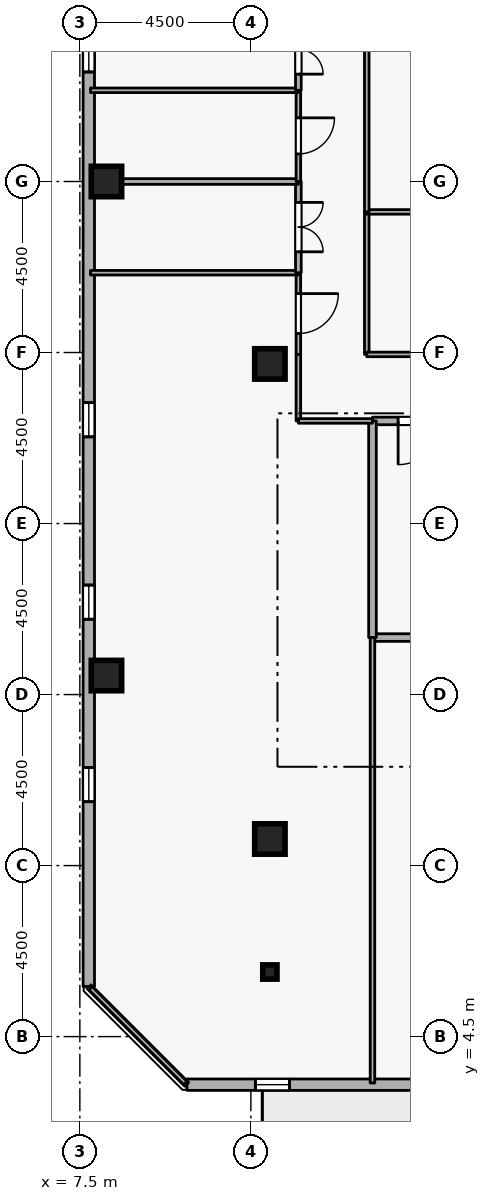
"""IFC4 building model, lengths in metres.
Left out: names, types, materials, properties, quantities, classifications, styles, units other than length and angle.
Written with IfcOpenShell. Run it as: python <this file> out.ifc"""

import sys

from ifc_helpers import new_model, si_unit, direction, frame, frame_2d, origin, origin_2d, place, context, subcontext, project, spatial, rectangle, i_section, extrude, element, fill, save


model = new_model("IFC4")
c1 = context("Model", 3, precision=1e-05, world=origin(), true_north=direction((0.0, 1.0)))
c2 = subcontext(c1, "Body", "Model", "MODEL_VIEW")
j1 = project(units=[si_unit("LENGTHUNIT", "METRE"), si_unit("PLANEANGLEUNIT", "RADIAN")], contexts=[c1])
p1 = place(None, origin())
s1 = spatial("IfcSite", under=j1, at=p1, CompositionType="ELEMENT")
p2 = place(p1, origin())
s2 = spatial("IfcBuilding", under=s1, at=p2, CompositionType="ELEMENT")
p3 = place(p2, frame((0.0, 0.0, 276.3)))
s3 = spatial("IfcBuildingStorey", under=s2, at=p3, CompositionType="ELEMENT", Elevation=276.3)
for number, where, z_axis, x_axis in (
    (1, (12.5, 9.7, 0.0), (0.0, 0.0, 1.0), (1.0, 0.0, 0.0)),
    (2, (8.2, 14.0, 0.0), (0.0, 0.0, 1.0), (1.0, 0.0, 0.0)),
    (3, (8.2, 27.0, 0.0), (0.0, 0.0, 1.0), (1.0, 0.0, 0.0)),
    (4, (12.5, 22.2, 0.0), (0.0, 0.0, 1.0), (1.0, 0.0, 0.0)),
):
    element("IfcColumn", number, at=place(p3, frame(where, z_axis=z_axis, x_axis=x_axis)), inside=s3, PredefinedType="COLUMN", context=c2, shape_type="SweptSolid", body=[
        extrude(rectangle(XDim=0.8, YDim=0.8, at=origin_2d()), origin(), (0.0, 0.0, 1.0), 3.6),
    ])
p4 = place(p3, frame((12.5, 6.2, 0.0), z_axis=(0.0, 0.0, 1.0), x_axis=(1.0, 0.0, 0.0)))
e5 = element("IfcColumn", 5, at=p4, inside=s3, PredefinedType="COLUMN", context=c2, shape_type="SweptSolid", body=[
    extrude(i_section(OverallWidth=0.375, OverallDepth=0.375, WebThickness=0.017, FlangeThickness=0.027, FilletRadius=0.015, at=origin_2d()), origin(), (0.0, 0.0, 1.0), 3.6),
])
p5 = place(p3, frame((10.319, 3.235, 0.0), z_axis=(0.0, 0.0, 1.0), x_axis=(1.0, 0.0, 0.0)))
e6 = element("IfcWall", 6, at=p5, inside=s3, PredefinedType="STANDARD", context=c2, shape_type="SweptSolid", body=[
    extrude(rectangle(XDim=36.363, YDim=0.3, at=frame_2d((18.181, 0.0))), origin(), (0.0, 0.0, 1.0), 2.66),
])
p6 = place(p5, frame((23.581, 0.0, 0.0)))
e7 = element("IfcOpeningElement", 7, at=p6, cuts=e6, PredefinedType="OPENING", context=c2, shape_type="SweptSolid", body=[
    extrude(rectangle(XDim=1.0, YDim=2.08, at=frame_2d((0.5, 1.04))), frame((0.0, 0.16, 0.0), z_axis=(0.0, -1.0, 0.0), x_axis=(1.0, 0.0, 0.0)), (0.0, 0.0, 1.0), 0.32),
])
p7 = place(p5, frame((1.8, 0.0, 0.72)))
e8 = element("IfcOpeningElement", 8, at=p7, cuts=e6, PredefinedType="OPENING", context=c2, shape_type="SweptSolid", body=[
    extrude(rectangle(XDim=0.9, YDim=1.75, at=frame_2d((0.45, 0.875))), frame((0.0, 0.16, 0.0), z_axis=(0.0, -1.0, 0.0), x_axis=(1.0, 0.0, 0.0)), (0.0, 0.0, 1.0), 0.32),
])
p8 = place(p5, frame((6.6, 0.0, 0.72)))
e9 = element("IfcOpeningElement", 9, at=p8, cuts=e6, PredefinedType="OPENING", context=c2, shape_type="SweptSolid", body=[
    extrude(rectangle(XDim=0.9, YDim=1.75, at=frame_2d((0.45, 0.875))), frame((0.0, 0.16, 0.0), z_axis=(0.0, -1.0, 0.0), x_axis=(1.0, 0.0, 0.0)), (0.0, 0.0, 1.0), 0.32),
])
p9 = place(p5, frame((11.4, 0.0, 0.72)))
e10 = element("IfcOpeningElement", 10, at=p9, cuts=e6, PredefinedType="OPENING", context=c2, shape_type="SweptSolid", body=[
    extrude(rectangle(XDim=0.9, YDim=1.75, at=frame_2d((0.45, 0.875))), frame((0.0, 0.16, 0.0), z_axis=(0.0, -1.0, 0.0), x_axis=(1.0, 0.0, 0.0)), (0.0, 0.0, 1.0), 0.32),
])
p10 = place(p5, frame((16.2, 0.0, 0.72)))
e11 = element("IfcOpeningElement", 11, at=p10, cuts=e6, PredefinedType="OPENING", context=c2, shape_type="SweptSolid", body=[
    extrude(rectangle(XDim=0.9, YDim=1.75, at=frame_2d((0.45, 0.875))), frame((0.0, 0.16, 0.0), z_axis=(0.0, -1.0, 0.0), x_axis=(1.0, 0.0, 0.0)), (0.0, 0.0, 1.0), 0.32),
])
p11 = place(p5, frame((21.0, 0.0, 0.72)))
e12 = element("IfcOpeningElement", 12, at=p11, cuts=e6, PredefinedType="OPENING", context=c2, shape_type="SweptSolid", body=[
    extrude(rectangle(XDim=0.9, YDim=1.75, at=frame_2d((0.45, 0.875))), frame((0.0, 0.16, 0.0), z_axis=(0.0, -1.0, 0.0), x_axis=(1.0, 0.0, 0.0)), (0.0, 0.0, 1.0), 0.32),
])
p12 = place(p5, frame((25.8, 0.0, 0.72)))
e13 = element("IfcOpeningElement", 13, at=p12, cuts=e6, PredefinedType="OPENING", context=c2, shape_type="SweptSolid", body=[
    extrude(rectangle(XDim=0.9, YDim=1.75, at=frame_2d((0.45, 0.875))), frame((0.0, 0.16, 0.0), z_axis=(0.0, -1.0, 0.0), x_axis=(1.0, 0.0, 0.0)), (0.0, 0.0, 1.0), 0.32),
])
p13 = place(p5, frame((30.6, 0.0, 0.72)))
e14 = element("IfcOpeningElement", 14, at=p13, cuts=e6, PredefinedType="OPENING", context=c2, shape_type="SweptSolid", body=[
    extrude(rectangle(XDim=0.9, YDim=1.75, at=frame_2d((0.45, 0.875))), frame((0.0, 0.16, 0.0), z_axis=(0.0, -1.0, 0.0), x_axis=(1.0, 0.0, 0.0)), (0.0, 0.0, 1.0), 0.32),
])
p14 = place(p3, frame((7.735, 42.181, 0.0), z_axis=(0.0, 0.0, 1.0), x_axis=(0.0, -1.0, 0.0)))
e15 = element("IfcWall", 15, at=p14, inside=s3, PredefinedType="STANDARD", context=c2, shape_type="SweptSolid", body=[
    extrude(rectangle(XDim=36.363, YDim=0.3, at=frame_2d((18.181, 0.0))), origin(), (0.0, 0.0, 1.0), 2.66),
])
p15 = place(p14, frame((6.6, 0.0, 0.72)))
e16 = element("IfcOpeningElement", 16, at=p15, cuts=e15, PredefinedType="OPENING", context=c2, shape_type="SweptSolid", body=[
    extrude(rectangle(XDim=0.9, YDim=1.75, at=frame_2d((0.45, 0.875))), frame((0.0, 0.16, 0.0), z_axis=(0.0, -1.0, 0.0), x_axis=(1.0, 0.0, 0.0)), (0.0, 0.0, 1.0), 0.32),
])
p16 = place(p14, frame((11.4, 0.0, 0.72)))
e17 = element("IfcOpeningElement", 17, at=p16, cuts=e15, PredefinedType="OPENING", context=c2, shape_type="SweptSolid", body=[
    extrude(rectangle(XDim=0.9, YDim=1.75, at=frame_2d((0.45, 0.875))), frame((0.0, 0.16, 0.0), z_axis=(0.0, -1.0, 0.0), x_axis=(1.0, 0.0, 0.0)), (0.0, 0.0, 1.0), 0.32),
])
p17 = place(p14, frame((21.0, 0.0, 0.72)))
e18 = element("IfcOpeningElement", 18, at=p17, cuts=e15, PredefinedType="OPENING", context=c2, shape_type="SweptSolid", body=[
    extrude(rectangle(XDim=0.9, YDim=1.75, at=frame_2d((0.45, 0.875))), frame((0.0, 0.16, 0.0), z_axis=(0.0, -1.0, 0.0), x_axis=(1.0, 0.0, 0.0)), (0.0, 0.0, 1.0), 0.32),
])
p18 = place(p14, frame((25.8, 0.0, 0.72)))
e19 = element("IfcOpeningElement", 19, at=p18, cuts=e15, PredefinedType="OPENING", context=c2, shape_type="SweptSolid", body=[
    extrude(rectangle(XDim=0.9, YDim=1.75, at=frame_2d((0.45, 0.875))), frame((0.0, 0.16, 0.0), z_axis=(0.0, -1.0, 0.0), x_axis=(1.0, 0.0, 0.0)), (0.0, 0.0, 1.0), 0.32),
])
p19 = place(p14, frame((30.6, 0.0, 0.72)))
e20 = element("IfcOpeningElement", 20, at=p19, cuts=e15, PredefinedType="OPENING", context=c2, shape_type="SweptSolid", body=[
    extrude(rectangle(XDim=0.9, YDim=1.75, at=frame_2d((0.45, 0.875))), frame((0.0, 0.16, 0.0), z_axis=(0.0, -1.0, 0.0), x_axis=(1.0, 0.0, 0.0)), (0.0, 0.0, 1.0), 0.32),
])
p20 = place(p3, frame((15.2, 15.0, 0.0), z_axis=(0.0, 0.0, 1.0), x_axis=(1.0, 0.0, 0.0)))
e21 = element("IfcWall", 21, at=p20, inside=s3, PredefinedType="STANDARD", context=c2, shape_type="SweptSolid", body=[
    extrude(rectangle(XDim=2.5, YDim=0.2, at=frame_2d((1.25, 0.0))), origin(), (0.0, 0.0, 1.0), 3.26),
])
p21 = place(p3, frame((17.7, 20.7, 0.0), z_axis=(0.0, 0.0, 1.0), x_axis=(-1.0, 0.0, 0.0)))
e22 = element("IfcWall", 22, at=p21, inside=s3, PredefinedType="STANDARD", context=c2, shape_type="SweptSolid", body=[
    extrude(rectangle(XDim=2.5, YDim=0.2, at=frame_2d((1.25, 0.0))), origin(), (0.0, 0.0, 1.0), 3.26),
])
p22 = place(p21, frame((0.675, 0.0, 0.0)))
e23 = element("IfcOpeningElement", 23, at=p22, cuts=e22, PredefinedType="OPENING", context=c2, shape_type="SweptSolid", body=[
    extrude(rectangle(XDim=1.15, YDim=2.1, at=frame_2d((0.575, 1.05))), frame((0.0, 0.11, 0.0), z_axis=(0.0, -1.0, 0.0), x_axis=(1.0, 0.0, 0.0)), (0.0, 0.0, 1.0), 0.22),
])
p23 = place(p3, frame((15.2, 20.7, 0.0), z_axis=(0.0, 0.0, 1.0), x_axis=(0.0, -1.0, 0.0)))
e24 = element("IfcWall", 24, at=p23, inside=s3, PredefinedType="STANDARD", context=c2, shape_type="SweptSolid", body=[
    extrude(rectangle(XDim=5.7, YDim=0.2, at=frame_2d((2.85, 0.0))), origin(), (0.0, 0.0, 1.0), 3.26),
])
p24 = place(p3, frame((13.25, 24.6, 0.0), z_axis=(0.0, 0.0, 1.0), x_axis=(0.0, -1.0, 0.0)))
e25 = element("IfcWall", 25, at=p24, inside=s3, PredefinedType="PARTITIONING", context=c2, shape_type="SweptSolid", body=[
    extrude(rectangle(XDim=2.15, YDim=0.12, at=frame_2d((1.075, 0.0))), origin(), (0.0, 0.0, 1.0), 3.26),
])
p25 = place(p24, frame((0.55, 0.0, 0.0)))
e26 = element("IfcOpeningElement", 26, at=p25, cuts=e25, PredefinedType="OPENING", context=c2, shape_type="SweptSolid", body=[
    extrude(rectangle(XDim=1.05, YDim=2.1, at=frame_2d((0.525, 1.05))), frame((0.0, 0.07, 0.0), z_axis=(0.0, -1.0, 0.0), x_axis=(1.0, 0.0, 0.0)), (0.0, 0.0, 1.0), 0.14),
])
p26 = place(p3, frame((13.25, 22.45, 0.0), z_axis=(0.0, 0.0, 1.0), x_axis=(0.0, -1.0, 0.0)))
e27 = element("IfcWall", 27, at=p26, inside=s3, PredefinedType="PARTITIONING", context=c2, shape_type="SweptSolid", body=[
    extrude(rectangle(XDim=1.75, YDim=0.12, at=frame_2d((0.875, 0.0))), origin(), (0.0, 0.0, 1.0), 3.26),
])
p27 = place(p3, frame((13.25, 20.7, 0.0), z_axis=(0.0, 0.0, 1.0), x_axis=(1.0, 0.0, 0.0)))
e28 = element("IfcWall", 28, at=p27, inside=s3, PredefinedType="PARTITIONING", context=c2, shape_type="SweptSolid", body=[
    extrude(rectangle(XDim=1.95, YDim=0.12, at=frame_2d((0.975, 0.0))), origin(), (0.0, 0.0, 1.0), 3.26),
])
p28 = place(p3, frame((15.2, 15.0, 0.0), z_axis=(0.0, 0.0, 1.0), x_axis=(0.0, -1.0, 0.0)))
e29 = element("IfcWall", 29, at=p28, inside=s3, PredefinedType="PARTITIONING", context=c2, shape_type="SweptSolid", body=[
    extrude(rectangle(XDim=11.72, YDim=0.12, at=frame_2d((5.86, 0.0))), origin(), (0.0, 0.0, 1.0), 3.26),
])
p29 = place(p3, frame((10.275, 3.28, 0.0), z_axis=(0.0, 0.0, 1.0), x_axis=(-0.707106781187, 0.707106781187, 0.0)))
e30 = element("IfcWall", 30, at=p29, inside=s3, PredefinedType="PARTITIONING", context=c2, shape_type="SweptSolid", body=[
    extrude(rectangle(XDim=3.528, YDim=0.12, at=frame_2d((1.764, 0.0))), origin(), (0.0, 0.0, 1.0), 3.26),
])
p30 = place(p3, frame((7.78, 24.6, 0.0), z_axis=(0.0, 0.0, 1.0), x_axis=(1.0, 0.0, 0.0)))
e31 = element("IfcWall", 31, at=p30, inside=s3, PredefinedType="PARTITIONING", context=c2, shape_type="SweptSolid", body=[
    extrude(rectangle(XDim=5.47, YDim=0.12, at=frame_2d((2.735, 0.0))), origin(), (0.0, 0.0, 1.0), 3.26),
])
p31 = place(p3, frame((13.25, 27.0, 0.0), z_axis=(0.0, 0.0, 1.0), x_axis=(0.0, -1.0, 0.0)))
e32 = element("IfcWall", 32, at=p31, inside=s3, PredefinedType="PARTITIONING", context=c2, shape_type="SweptSolid", body=[
    extrude(rectangle(XDim=2.4, YDim=0.15, at=frame_2d((1.2, 0.0))), origin(), (0.0, 0.0, 1.0), 3.26),
])
p32 = place(p31, frame((0.55, 0.0, 0.0)))
e33 = element("IfcOpeningElement", 33, at=p32, cuts=e32, PredefinedType="OPENING", context=c2, shape_type="SweptSolid", body=[
    extrude(rectangle(XDim=1.3, YDim=2.12, at=frame_2d((0.65, 1.06))), frame((0.0, 0.085, 0.0), z_axis=(0.0, -1.0, 0.0), x_axis=(1.0, 0.0, 0.0)), (0.0, 0.0, 1.0), 0.17),
])
p33 = place(p3, frame((7.78, 27.0, 0.0), z_axis=(0.0, 0.0, 1.0), x_axis=(1.0, 0.0, 0.0)))
e34 = element("IfcWall", 34, at=p33, inside=s3, PredefinedType="PARTITIONING", context=c2, shape_type="SweptSolid", body=[
    extrude(rectangle(XDim=5.47, YDim=0.15, at=frame_2d((2.735, 0.0))), origin(), (0.0, 0.0, 1.0), 2.802),
])
p34 = place(p3, frame((13.25, 29.4, 0.0), z_axis=(0.0, 0.0, 1.0), x_axis=(0.0, -1.0, 0.0)))
e35 = element("IfcWall", 35, at=p34, inside=s3, PredefinedType="PARTITIONING", context=c2, shape_type="SweptSolid", body=[
    extrude(rectangle(XDim=2.4, YDim=0.12, at=frame_2d((1.2, 0.0))), origin(), (0.0, 0.0, 1.0), 3.26),
])
p35 = place(p34, frame((0.725, 0.0, 0.0)))
e36 = element("IfcOpeningElement", 36, at=p35, cuts=e35, PredefinedType="OPENING", context=c2, shape_type="SweptSolid", body=[
    extrude(rectangle(XDim=0.95, YDim=2.1, at=frame_2d((0.475, 1.05))), frame((0.0, 0.07, 0.0), z_axis=(0.0, -1.0, 0.0), x_axis=(1.0, 0.0, 0.0)), (0.0, 0.0, 1.0), 0.14),
])
p36 = place(p3, frame((7.78, 29.4, 0.0), z_axis=(0.0, 0.0, 1.0), x_axis=(1.0, 0.0, 0.0)))
e37 = element("IfcWall", 37, at=p36, inside=s3, PredefinedType="PARTITIONING", context=c2, shape_type="SweptSolid", body=[
    extrude(rectangle(XDim=5.47, YDim=0.12, at=frame_2d((2.735, 0.0))), origin(), (0.0, 0.0, 1.0), 3.26),
])
p37 = place(p3, frame((13.25, 31.55, 0.0), z_axis=(0.0, 0.0, 1.0), x_axis=(0.0, -1.0, 0.0)))
e38 = element("IfcWall", 38, at=p37, inside=s3, PredefinedType="PARTITIONING", context=c2, shape_type="SweptSolid", body=[
    extrude(rectangle(XDim=2.15, YDim=0.15, at=frame_2d((1.075, 0.0))), origin(), (0.0, 0.0, 1.0), 3.26),
])
p38 = place(p37, frame((0.425, 0.0, 0.0)))
e39 = element("IfcOpeningElement", 39, at=p38, cuts=e38, PredefinedType="OPENING", context=c2, shape_type="SweptSolid", body=[
    extrude(rectangle(XDim=1.3, YDim=2.12, at=frame_2d((0.65, 1.06))), frame((0.0, 0.085, 0.0), z_axis=(0.0, -1.0, 0.0), x_axis=(1.0, 0.0, 0.0)), (0.0, 0.0, 1.0), 0.17),
])
p39 = place(p3, frame((15.05, 22.45, 0.0), z_axis=(0.0, 0.0, 1.0), x_axis=(0.0, 1.0, 0.0)))
e40 = element("IfcWall", 40, at=p39, inside=s3, PredefinedType="PARTITIONING", context=c2, shape_type="SweptSolid", body=[
    extrude(rectangle(XDim=3.75, YDim=0.12, at=frame_2d((1.875, 0.0))), origin(), (0.0, 0.0, 1.0), 3.26),
])
p40 = place(p3, frame((15.05, 26.2, 0.0), z_axis=(0.0, 0.0, 1.0), x_axis=(1.0, 0.0, 0.0)))
e41 = element("IfcWall", 41, at=p40, inside=s3, PredefinedType="PARTITIONING", context=c2, shape_type="SweptSolid", body=[
    extrude(rectangle(XDim=5.85, YDim=0.12, at=frame_2d((2.925, 0.0))), origin(), (0.0, 0.0, 1.0), 3.26),
])
p41 = place(p3, frame((20.9, 22.45, 0.0), z_axis=(0.0, 0.0, 1.0), x_axis=(-1.0, 0.0, 0.0)))
e42 = element("IfcWall", 42, at=p41, inside=s3, PredefinedType="PARTITIONING", context=c2, shape_type="SweptSolid", body=[
    extrude(rectangle(XDim=5.85, YDim=0.12, at=frame_2d((2.925, 0.0))), origin(), (0.0, 0.0, 1.0), 3.26),
])
p42 = place(p41, frame((2.45, 0.0, 0.0)))
e43 = element("IfcOpeningElement", 43, at=p42, cuts=e42, PredefinedType="OPENING", context=c2, shape_type="SweptSolid", body=[
    extrude(rectangle(XDim=0.95, YDim=2.1, at=frame_2d((0.475, 1.05))), frame((0.0, 0.07, 0.0), z_axis=(0.0, -1.0, 0.0), x_axis=(1.0, 0.0, 0.0)), (0.0, 0.0, 1.0), 0.14),
])
p43 = place(p3, frame((15.05, 26.2, 0.0), z_axis=(0.0, 0.0, 1.0), x_axis=(0.0, 1.0, 0.0)))
e44 = element("IfcWall", 44, at=p43, inside=s3, PredefinedType="PARTITIONING", context=c2, shape_type="SweptSolid", body=[
    extrude(rectangle(XDim=5.35, YDim=0.12, at=frame_2d((2.675, 0.0))), origin(), (0.0, 0.0, 1.0), 3.26),
])
p44 = place(p7, origin())
e45 = element("IfcWindow", 45, at=p44, inside=s3, PartitioningType="SINGLE_PANEL", PredefinedType="WINDOW", context=c2, shape_type="SweptSolid", body=[
    extrude(rectangle(XDim=0.9, YDim=1.75, at=frame_2d((0.45, 0.875))), frame((0.0, 0.03, 0.0), z_axis=(0.0, -1.0, 0.0), x_axis=(1.0, 0.0, 0.0)), (0.0, 0.0, 1.0), 0.06),
])
fill(e8, e45)
p45 = place(p16, origin())
e46 = element("IfcWindow", 46, at=p45, inside=s3, PartitioningType="SINGLE_PANEL", PredefinedType="WINDOW", context=c2, shape_type="SweptSolid", body=[
    extrude(rectangle(XDim=0.9, YDim=1.75, at=frame_2d((0.45, 0.875))), frame((0.0, 0.03, 0.0), z_axis=(0.0, -1.0, 0.0), x_axis=(1.0, 0.0, 0.0)), (0.0, 0.0, 1.0), 0.06),
])
fill(e17, e46)
p46 = place(p17, origin())
e47 = element("IfcWindow", 47, at=p46, inside=s3, PartitioningType="SINGLE_PANEL", PredefinedType="WINDOW", context=c2, shape_type="SweptSolid", body=[
    extrude(rectangle(XDim=0.9, YDim=1.75, at=frame_2d((0.45, 0.875))), frame((0.0, 0.03, 0.0), z_axis=(0.0, -1.0, 0.0), x_axis=(1.0, 0.0, 0.0)), (0.0, 0.0, 1.0), 0.06),
])
fill(e18, e47)
p47 = place(p18, origin())
e48 = element("IfcWindow", 48, at=p47, inside=s3, PartitioningType="SINGLE_PANEL", PredefinedType="WINDOW", context=c2, shape_type="SweptSolid", body=[
    extrude(rectangle(XDim=0.9, YDim=1.75, at=frame_2d((0.45, 0.875))), frame((0.0, 0.03, 0.0), z_axis=(0.0, -1.0, 0.0), x_axis=(1.0, 0.0, 0.0)), (0.0, 0.0, 1.0), 0.06),
])
fill(e19, e48)
p48 = place(p19, origin())
e49 = element("IfcWindow", 49, at=p48, inside=s3, PartitioningType="SINGLE_PANEL", PredefinedType="WINDOW", context=c2, shape_type="SweptSolid", body=[
    extrude(rectangle(XDim=0.9, YDim=1.75, at=frame_2d((0.45, 0.875))), frame((0.0, 0.03, 0.0), z_axis=(0.0, -1.0, 0.0), x_axis=(1.0, 0.0, 0.0)), (0.0, 0.0, 1.0), 0.06),
])
fill(e20, e49)
p49 = place(p22, origin())
e50 = element("IfcDoor", 50, at=p49, inside=s3, OperationType="SINGLE_SWING_RIGHT", PredefinedType="DOOR", context=c2, shape_type="SweptSolid", body=[
    extrude(rectangle(XDim=1.15, YDim=2.1, at=frame_2d((0.575, 1.05))), frame((0.0, 0.025, 0.0), z_axis=(0.0, -1.0, 0.0), x_axis=(1.0, 0.0, 0.0)), (0.0, 0.0, 1.0), 0.05),
])
fill(e23, e50)
p50 = place(p25, origin())
e51 = element("IfcDoor", 51, at=p50, inside=s3, OperationType="SINGLE_SWING_LEFT", PredefinedType="DOOR", context=c2, shape_type="SweptSolid", body=[
    extrude(rectangle(XDim=1.05, YDim=2.1, at=frame_2d((0.525, 1.05))), frame((0.0, 0.025, 0.0), z_axis=(0.0, -1.0, 0.0), x_axis=(1.0, 0.0, 0.0)), (0.0, 0.0, 1.0), 0.05),
])
fill(e26, e51)
p51 = place(p32, origin())
e52 = element("IfcDoor", 52, at=p51, inside=s3, OperationType="DOUBLE_DOOR_SINGLE_SWING", PredefinedType="DOOR", context=c2, shape_type="SweptSolid", body=[
    extrude(rectangle(XDim=1.3, YDim=2.12, at=frame_2d((0.65, 1.06))), frame((0.0, 0.025, 0.0), z_axis=(0.0, -1.0, 0.0), x_axis=(1.0, 0.0, 0.0)), (0.0, 0.0, 1.0), 0.05),
])
fill(e33, e52)
p52 = place(p35, origin())
e53 = element("IfcDoor", 53, at=p52, inside=s3, OperationType="SINGLE_SWING_LEFT", PredefinedType="DOOR", context=c2, shape_type="SweptSolid", body=[
    extrude(rectangle(XDim=0.95, YDim=2.1, at=frame_2d((0.475, 1.05))), frame((0.0, 0.025, 0.0), z_axis=(0.0, -1.0, 0.0), x_axis=(1.0, 0.0, 0.0)), (0.0, 0.0, 1.0), 0.05),
])
fill(e36, e53)
p53 = place(p38, origin())
e54 = element("IfcDoor", 54, at=p53, inside=s3, OperationType="DOUBLE_DOOR_SINGLE_SWING", PredefinedType="DOOR", context=c2, shape_type="SweptSolid", body=[
    extrude(rectangle(XDim=1.3, YDim=2.12, at=frame_2d((0.65, 1.06))), frame((0.0, 0.025, 0.0), z_axis=(0.0, -1.0, 0.0), x_axis=(1.0, 0.0, 0.0)), (0.0, 0.0, 1.0), 0.05),
])
fill(e39, e54)
save(model, sys.argv[1])
